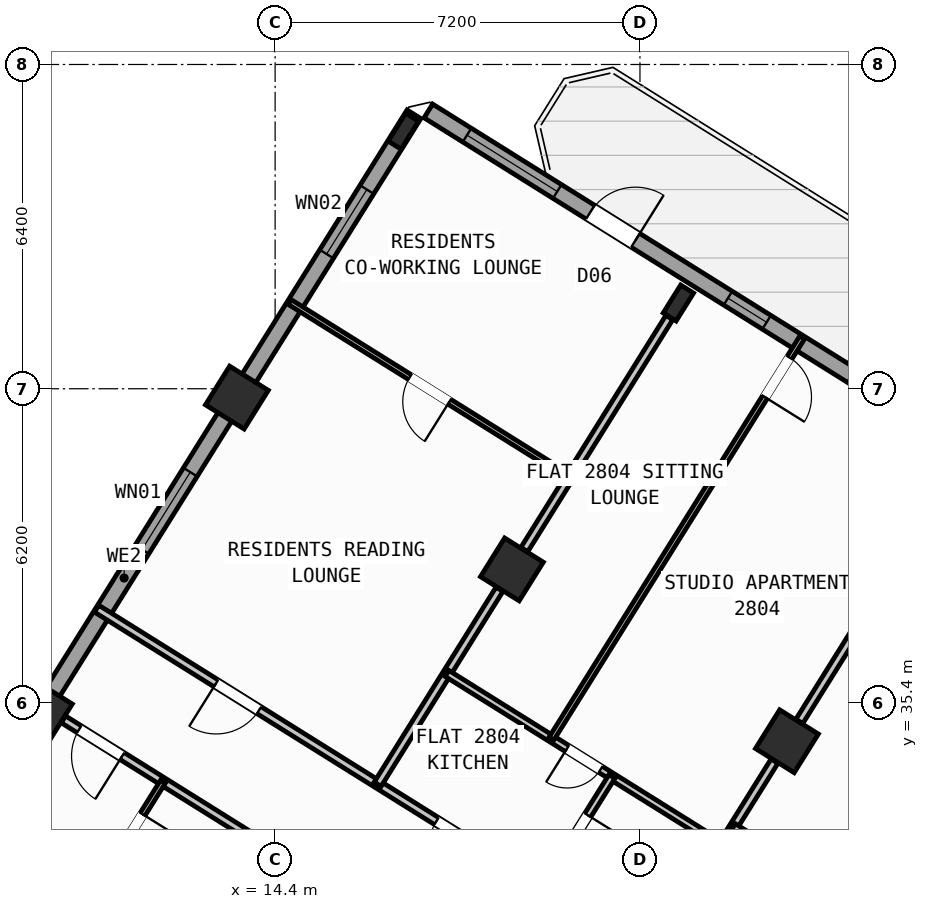
"""IFC4 building model, lengths in metres.
Left out: names, types, materials, properties, quantities, classifications, styles, units other than length and angle.
Written with IfcOpenShell. Run it as: python <this file> out.ifc"""

import sys

from ifc_helpers import new_model, si_unit, direction, frame, frame_2d, origin, origin_2d, place, context, subcontext, project, spatial, rectangle, hollow_rectangle, i_section, extrude, source, transform, mapped, element, fill, save


model = new_model("IFC4")
c1 = context("Model", 3, precision=1e-05, world=origin(), true_north=direction((0.0, 1.0)))
c2 = subcontext(c1, "Body", "Model", "MODEL_VIEW")
j1 = project(units=[si_unit("LENGTHUNIT", "METRE"), si_unit("PLANEANGLEUNIT", "RADIAN")], contexts=[c1])
p1 = place(None, origin())
s1 = spatial("IfcSite", under=j1, at=p1, CompositionType="ELEMENT")
p2 = place(p1, origin())
s2 = spatial("IfcBuilding", under=s1, at=p2, CompositionType="ELEMENT")
p3 = place(p2, frame((0.0, 0.0, 112.5)))
s3 = spatial("IfcBuildingStorey", under=s2, at=p3, CompositionType="ELEMENT", Elevation=112.5)
m1 = source(origin(), c2, "Body", "SweptSolid", [
    extrude(hollow_rectangle(XDim=0.9, YDim=0.9, WallThickness=0.036, at=origin_2d()), origin(), (0.0, 0.0, 1.0), 3.6),
])
p4 = place(p3, frame((24.5, 34.643, 0.0), z_axis=(0.0, 0.0, 1.0), x_axis=(-0.848048096156, 0.529919264233, 0.0)))
e1 = element("IfcColumn", 1, at=p4, inside=s3, PredefinedType="COLUMN", context=c2, shape_type="MappedRepresentation", body=[
    mapped(m1, transform((0.0, 0.0, 0.0), scale=1.0)),
])
m2 = source(origin(), c2, "Body", "SweptSolid", [
    extrude(i_section(OverallWidth=0.3, OverallDepth=0.65, WebThickness=0.016, FlangeThickness=0.031, at=origin_2d()), origin(), (0.0, 0.0, 1.0), 3.6),
])
p5 = place(p3, frame((22.358, 43.292, 0.0), z_axis=(0.0, 0.0, 1.0), x_axis=(-0.848048096156, 0.529919264233, 0.0)))
e2 = element("IfcColumn", 2, at=p5, inside=s3, PredefinedType="COLUMN", context=c2, shape_type="MappedRepresentation", body=[
    mapped(m2, transform((0.0, 0.0, 0.0), scale=1.0)),
])
p6 = place(p3, frame((19.073, 38.034, 0.0), z_axis=(0.0, 0.0, 1.0), x_axis=(-0.848048096156, 0.529919264233, 0.0)))
e3 = element("IfcColumn", 3, at=p6, inside=s3, PredefinedType="COLUMN", context=c2, shape_type="MappedRepresentation", body=[
    mapped(m1, transform((0.0, 0.0, 0.0), scale=1.0)),
])
p7 = place(p3, frame((16.931, 46.684, 0.0), z_axis=(0.0, 0.0, 1.0), x_axis=(-0.848048096156, 0.529919264233, 0.0)))
e4 = element("IfcColumn", 4, at=p7, inside=s3, PredefinedType="COLUMN", context=c2, shape_type="MappedRepresentation", body=[
    mapped(m2, transform((0.0, 0.0, 0.0), scale=1.0)),
])
for number, where, z_axis, x_axis in (
    (5, (13.646, 41.426, 0.0), (0.0, 0.0, 1.0), (-0.848, 0.53, 0.0)),
    (6, (9.777, 35.235, 0.0), (0.0, 0.0, 1.0), (-0.848, 0.53, 0.0)),
):
    element("IfcColumn", number, at=place(p3, frame(where, z_axis=z_axis, x_axis=x_axis)), inside=s3, PredefinedType="COLUMN", context=c2, shape_type="MappedRepresentation", body=[
        mapped(m1, transform((0.0, 0.0, 0.0), scale=1.0)),
    ])
p8 = place(p3, frame((5.7, 28.71, 0.0), z_axis=(0.0, 0.0, 1.0), x_axis=(0.529923711467, 0.8480453172, 0.0)))
e7 = element("IfcWall", 7, at=p8, inside=s3, PredefinedType="STANDARD", context=c2, shape_type="SweptSolid", body=[
    extrude(rectangle(XDim=21.587, YDim=0.32, at=frame_2d((10.794, 0.0))), origin(), (0.0, 0.0, 1.0), 2.775),
])
p9 = place(p8, frame((1.984, 0.0, 0.8)))
e8 = element("IfcOpeningElement", 8, at=p9, cuts=e7, PredefinedType="OPENING", context=c2, shape_type="SweptSolid", body=[
    extrude(rectangle(XDim=2.1, YDim=1.55, at=frame_2d((1.05, 0.775))), frame((0.0, 0.17, 0.0), z_axis=(0.0, -1.0, 0.0), x_axis=(1.0, 0.0, 0.0)), (0.0, 0.0, 1.0), 0.34),
])
p10 = place(p8, frame((11.459, 0.0, 0.85)))
e9 = element("IfcOpeningElement", 9, at=p10, cuts=e7, PredefinedType="OPENING", context=c2, shape_type="SweptSolid", body=[
    extrude(rectangle(XDim=1.8, YDim=1.5, at=frame_2d((0.9, 0.75))), frame((0.0, 0.17, 0.0), z_axis=(0.0, -1.0, 0.0), x_axis=(1.0, 0.0, 0.0)), (0.0, 0.0, 1.0), 0.34),
])
p11 = place(p8, frame((18.335, 0.0, 0.85)))
e10 = element("IfcOpeningElement", 10, at=p11, cuts=e7, PredefinedType="OPENING", context=c2, shape_type="SweptSolid", body=[
    extrude(rectangle(XDim=1.5, YDim=1.5, at=frame_2d((0.75, 0.75))), frame((0.0, 0.17, 0.0), z_axis=(0.0, -1.0, 0.0), x_axis=(1.0, 0.0, 0.0)), (0.0, 0.0, 1.0), 0.34),
])
p12 = place(p3, frame((17.424, 47.083, 0.0), z_axis=(0.0, 0.0, 1.0), x_axis=(0.848049927979, -0.529916332693, 0.0)))
e11 = element("IfcWall", 11, at=p12, inside=s3, PredefinedType="STANDARD", context=c2, shape_type="SweptSolid", body=[
    extrude(rectangle(XDim=29.223, YDim=0.32, at=frame_2d((14.612, 0.0))), origin(), (0.0, 0.0, 1.0), 3.35),
])
p13 = place(p12, frame((3.77, 0.0, 0.0)))
e12 = element("IfcOpeningElement", 12, at=p13, cuts=e11, PredefinedType="OPENING", context=c2, shape_type="SweptSolid", body=[
    extrude(rectangle(XDim=1.05, YDim=2.15, at=frame_2d((0.525, 1.075))), frame((0.0, 0.17, 0.0), z_axis=(0.0, -1.0, 0.0), x_axis=(1.0, 0.0, 0.0)), (0.0, 0.0, 1.0), 0.34),
])
p14 = place(p12, frame((0.9, 0.0, 0.8)))
e13 = element("IfcOpeningElement", 13, at=p14, cuts=e11, PredefinedType="OPENING", context=c2, shape_type="SweptSolid", body=[
    extrude(rectangle(XDim=2.1, YDim=1.55, at=frame_2d((1.05, 0.775))), frame((0.0, 0.17, 0.0), z_axis=(0.0, -1.0, 0.0), x_axis=(1.0, 0.0, 0.0)), (0.0, 0.0, 1.0), 0.34),
])
p15 = place(p12, frame((6.972, 0.0, 1.0)))
e14 = element("IfcOpeningElement", 14, at=p15, cuts=e11, PredefinedType="OPENING", context=c2, shape_type="SweptSolid", body=[
    extrude(rectangle(XDim=0.9, YDim=1.25, at=frame_2d((0.45, 0.625))), frame((0.0, 0.17, 0.0), z_axis=(0.0, -1.0, 0.0), x_axis=(1.0, 0.0, 0.0)), (0.0, 0.0, 1.0), 0.34),
])
p16 = place(p12, frame((9.847, 0.0, 0.85)))
e15 = element("IfcOpeningElement", 15, at=p16, cuts=e11, PredefinedType="OPENING", context=c2, shape_type="SweptSolid", body=[
    extrude(rectangle(XDim=1.5, YDim=1.5, at=frame_2d((0.75, 0.75))), frame((0.0, 0.17, 0.0), z_axis=(0.0, -1.0, 0.0), x_axis=(1.0, 0.0, 0.0)), (0.0, 0.0, 1.0), 0.34),
])
p17 = place(p12, frame((13.889, 0.0, 0.95)))
e16 = element("IfcOpeningElement", 16, at=p17, cuts=e11, PredefinedType="OPENING", context=c2, shape_type="SweptSolid", body=[
    extrude(rectangle(XDim=1.2, YDim=1.4, at=frame_2d((0.6, 0.7))), frame((0.0, 0.17, 0.0), z_axis=(0.0, -1.0, 0.0), x_axis=(1.0, 0.0, 0.0)), (0.0, 0.0, 1.0), 0.34),
])
p18 = place(p12, frame((17.254, 0.0, 1.0)))
e17 = element("IfcOpeningElement", 17, at=p18, cuts=e11, PredefinedType="OPENING", context=c2, shape_type="SweptSolid", body=[
    extrude(rectangle(XDim=0.9, YDim=1.25, at=frame_2d((0.45, 0.625))), frame((0.0, 0.17, 0.0), z_axis=(0.0, -1.0, 0.0), x_axis=(1.0, 0.0, 0.0)), (0.0, 0.0, 1.0), 0.34),
])
p19 = place(p12, frame((20.764, 0.0, 0.8)))
e18 = element("IfcOpeningElement", 18, at=p19, cuts=e11, PredefinedType="OPENING", context=c2, shape_type="SweptSolid", body=[
    extrude(rectangle(XDim=2.1, YDim=1.55, at=frame_2d((1.05, 0.775))), frame((0.0, 0.17, 0.0), z_axis=(0.0, -1.0, 0.0), x_axis=(1.0, 0.0, 0.0)), (0.0, 0.0, 1.0), 0.34),
])
p20 = place(p12, frame((25.403, 0.0, 0.8)))
e19 = element("IfcOpeningElement", 19, at=p20, cuts=e11, PredefinedType="OPENING", context=c2, shape_type="SweptSolid", body=[
    extrude(rectangle(XDim=2.1, YDim=1.55, at=frame_2d((1.05, 0.775))), frame((0.0, 0.17, 0.0), z_axis=(0.0, -1.0, 0.0), x_axis=(1.0, 0.0, 0.0)), (0.0, 0.0, 1.0), 0.34),
])
p21 = place(p3, frame((31.239, 38.274, 0.0), z_axis=(0.0, 0.0, 1.0), x_axis=(-0.529925472745, -0.848044216616, 0.0)))
e20 = element("IfcWall", 20, at=p21, inside=s3, PredefinedType="PARTITIONING", context=c2, shape_type="SweptSolid", body=[
    extrude(rectangle(XDim=11.65, YDim=0.16, at=frame_2d((5.825, 0.0))), origin(), (0.0, 0.0, 1.0), 3.34),
])
p22 = place(p3, frame((25.065, 28.394, 0.0), z_axis=(0.0, 0.0, 1.0), x_axis=(-0.848048310262, 0.529918921593, 0.0)))
e21 = element("IfcWall", 21, at=p22, inside=s3, PredefinedType="PARTITIONING", context=c2, shape_type="SweptSolid", body=[
    extrude(rectangle(XDim=16.73, YDim=0.16, at=frame_2d((8.365, 0.0))), origin(), (0.0, 0.0, 1.0), 3.34),
])
p23 = place(p22, frame((2.22, 0.0, 0.0)))
e22 = element("IfcOpeningElement", 22, at=p23, cuts=e21, PredefinedType="OPENING", context=c2, shape_type="SweptSolid", body=[
    extrude(rectangle(XDim=0.86, YDim=2.05, at=frame_2d((0.43, 1.025))), frame((0.0, 0.09, 0.0), z_axis=(0.0, -1.0, 0.0), x_axis=(1.0, 0.0, 0.0)), (0.0, 0.0, 1.0), 0.18),
])
p24 = place(p22, frame((7.82, 0.0, 0.0)))
e23 = element("IfcOpeningElement", 23, at=p24, cuts=e21, PredefinedType="OPENING", context=c2, shape_type="SweptSolid", body=[
    extrude(rectangle(XDim=1.0, YDim=2.1, at=frame_2d((0.5, 1.05))), frame((0.0, 0.09, 0.0), z_axis=(0.0, -1.0, 0.0), x_axis=(1.0, 0.0, 0.0)), (0.0, 0.0, 1.0), 0.18),
])
p25 = place(p22, frame((12.95, 0.0, 0.0)))
e24 = element("IfcOpeningElement", 24, at=p25, cuts=e21, PredefinedType="OPENING", context=c2, shape_type="SweptSolid", body=[
    extrude(rectangle(XDim=1.0, YDim=2.1, at=frame_2d((0.5, 1.05))), frame((0.0, 0.09, 0.0), z_axis=(0.0, -1.0, 0.0), x_axis=(1.0, 0.0, 0.0)), (0.0, 0.0, 1.0), 0.18),
])
p26 = place(p3, frame((14.866, 32.173, 0.0), z_axis=(0.0, 0.0, 1.0), x_axis=(-0.848053401719, 0.529910773464, 0.0)))
e25 = element("IfcWall", 25, at=p26, inside=s3, PredefinedType="PARTITIONING", context=c2, shape_type="SweptSolid", body=[
    extrude(rectangle(XDim=5.476, YDim=0.16, at=frame_2d((2.738, 0.0))), origin(), (0.0, 0.0, 1.0), 2.775),
])
p27 = place(p26, frame((4.108, 0.0, 0.0)))
e26 = element("IfcOpeningElement", 26, at=p27, cuts=e25, PredefinedType="OPENING", context=c2, shape_type="SweptSolid", body=[
    extrude(rectangle(XDim=1.0, YDim=2.1, at=frame_2d((0.5, 1.05))), frame((0.0, 0.09, 0.0), z_axis=(0.0, -1.0, 0.0), x_axis=(1.0, 0.0, 0.0)), (0.0, 0.0, 1.0), 0.18),
])
p28 = place(p3, frame((12.188, 33.847, 0.0), z_axis=(0.0, 0.0, 1.0), x_axis=(-0.529917860021, -0.848048973604, 0.0)))
e27 = element("IfcWall", 27, at=p28, inside=s3, PredefinedType="PARTITIONING", context=c2, shape_type="SweptSolid", body=[
    extrude(rectangle(XDim=8.12, YDim=0.11, at=frame_2d((4.06, 0.0))), origin(), (0.0, 0.0, 1.0), 3.34),
])
p29 = place(p28, frame((0.76, 0.0, 0.0)))
e28 = element("IfcOpeningElement", 28, at=p29, cuts=e27, PredefinedType="OPENING", context=c2, shape_type="SweptSolid", body=[
    extrude(rectangle(XDim=0.78, YDim=2.05, at=frame_2d((0.39, 1.025))), frame((0.0, 0.065, 0.0), z_axis=(0.0, -1.0, 0.0), x_axis=(1.0, 0.0, 0.0)), (0.0, 0.0, 1.0), 0.13),
])
p30 = place(p28, frame((4.8, 0.0, 0.0)))
e29 = element("IfcOpeningElement", 29, at=p30, cuts=e27, PredefinedType="OPENING", context=c2, shape_type="SweptSolid", body=[
    extrude(rectangle(XDim=0.92, YDim=2.08, at=frame_2d((0.46, 1.04))), frame((0.0, 0.065, 0.0), z_axis=(0.0, -1.0, 0.0), x_axis=(1.0, 0.0, 0.0)), (0.0, 0.0, 1.0), 0.13),
])
p31 = place(p3, frame((10.916, 31.811, 0.0), z_axis=(0.0, 0.0, 1.0), x_axis=(-0.84802195137, 0.529961102341, 0.0)))
e30 = element("IfcWall", 30, at=p31, inside=s3, PredefinedType="PLUMBINGWALL", context=c2, shape_type="SweptSolid", body=[
    extrude(rectangle(XDim=2.9, YDim=0.14, at=frame_2d((1.45, 0.0))), origin(), (0.0, 0.0, 1.0), 3.34),
])
p32 = place(p31, frame((0.99, 0.0, 0.0)))
e31 = element("IfcOpeningElement", 31, at=p32, cuts=e30, PredefinedType="OPENING", context=c2, shape_type="SweptSolid", body=[
    extrude(rectangle(XDim=0.92, YDim=2.08, at=frame_2d((0.46, 1.04))), frame((0.0, 0.08, 0.0), z_axis=(0.0, -1.0, 0.0), x_axis=(1.0, 0.0, 0.0)), (0.0, 0.0, 1.0), 0.16),
])
p33 = place(p3, frame((27.607, 39.615, 0.0), z_axis=(0.0, 0.0, 1.0), x_axis=(-0.529913610495, -0.848051628978, 0.0)))
e32 = element("IfcWall", 32, at=p33, inside=s3, PredefinedType="PARTITIONING", context=c2, shape_type="SweptSolid", body=[
    extrude(rectangle(XDim=5.401, YDim=0.16, at=frame_2d((2.7, 0.0))), origin(), (0.0, 0.0, 1.0), 2.775),
])
p34 = place(p3, frame((24.256, 34.251, 0.0), z_axis=(0.0, 0.0, 1.0), x_axis=(-0.529926399231, -0.848043637673, 0.0)))
e33 = element("IfcWall", 33, at=p34, inside=s3, PredefinedType="PARTITIONING", context=c2, shape_type="SweptSolid", body=[
    extrude(rectangle(XDim=4.538, YDim=0.16, at=frame_2d((2.269, 0.0))), origin(), (0.0, 0.0, 1.0), 2.775),
])
p35 = place(p3, frame((26.66, 30.947, 0.0), z_axis=(0.0, 0.0, 1.0), x_axis=(-0.84803087207, 0.529946827537, 0.0)))
e34 = element("IfcWall", 34, at=p35, inside=s3, PredefinedType="PLUMBINGWALL", context=c2, shape_type="SweptSolid", body=[
    extrude(rectangle(XDim=3.79, YDim=0.14, at=frame_2d((1.895, 0.0))), origin(), (0.0, 0.0, 1.0), 3.34),
])
p36 = place(p35, frame((2.23, 0.0, 0.0)))
e35 = element("IfcOpeningElement", 35, at=p36, cuts=e34, PredefinedType="OPENING", context=c2, shape_type="SweptSolid", body=[
    extrude(rectangle(XDim=0.92, YDim=2.08, at=frame_2d((0.46, 1.04))), frame((0.0, 0.08, 0.0), z_axis=(0.0, -1.0, 0.0), x_axis=(1.0, 0.0, 0.0)), (0.0, 0.0, 1.0), 0.16),
])
p37 = place(p3, frame((22.18, 43.006, 0.0), z_axis=(0.0, 0.0, 1.0), x_axis=(-0.529913610495, -0.848051628978, 0.0)))
e36 = element("IfcWall", 36, at=p37, inside=s3, PredefinedType="PARTITIONING", context=c2, shape_type="SweptSolid", body=[
    extrude(rectangle(XDim=5.401, YDim=0.16, at=frame_2d((2.7, 0.0))), origin(), (0.0, 0.0, 1.0), 2.775),
])
p38 = place(p3, frame((18.828, 37.643, 0.0), z_axis=(0.0, 0.0, 1.0), x_axis=(-0.529926399231, -0.848043637673, 0.0)))
e37 = element("IfcWall", 37, at=p38, inside=s3, PredefinedType="PARTITIONING", context=c2, shape_type="SweptSolid", body=[
    extrude(rectangle(XDim=4.538, YDim=0.16, at=frame_2d((2.269, 0.0))), origin(), (0.0, 0.0, 1.0), 2.775),
])
p39 = place(p3, frame((23.218, 32.591, 0.0), z_axis=(0.0, 0.0, 1.0), x_axis=(-0.848056163074, 0.529906354247, 0.0)))
e38 = element("IfcWall", 38, at=p39, inside=s3, PredefinedType="PLUMBINGWALL", context=c2, shape_type="SweptSolid", body=[
    extrude(rectangle(XDim=6.4, YDim=0.14, at=frame_2d((3.2, 0.0))), origin(), (0.0, 0.0, 1.0), 3.34),
])
p40 = place(p39, frame((2.824, 0.0, 0.0)))
e39 = element("IfcOpeningElement", 39, at=p40, cuts=e38, PredefinedType="OPENING", context=c2, shape_type="SweptSolid", body=[
    extrude(rectangle(XDim=0.78, YDim=2.05, at=frame_2d((0.39, 1.025))), frame((0.0, 0.08, 0.0), z_axis=(0.0, -1.0, 0.0), x_axis=(1.0, 0.0, 0.0)), (0.0, 0.0, 1.0), 0.16),
])
p41 = place(p3, frame((21.047, 33.947, 0.0), z_axis=(0.0, 0.0, 1.0), x_axis=(-0.529913878929, -0.848051461244, 0.0)))
e40 = element("IfcWall", 40, at=p41, inside=s3, PredefinedType="PLUMBINGWALL", context=c2, shape_type="SweptSolid", body=[
    extrude(rectangle(XDim=2.58, YDim=0.14, at=frame_2d((1.29, 0.0))), origin(), (0.0, 0.0, 1.0), 3.34),
])
p42 = place(p41, frame((0.9, 0.0, 0.0)))
e41 = element("IfcOpeningElement", 41, at=p42, cuts=e40, PredefinedType="OPENING", context=c2, shape_type="SweptSolid", body=[
    extrude(rectangle(XDim=0.78, YDim=2.05, at=frame_2d((0.39, 1.025))), frame((0.0, 0.08, 0.0), z_axis=(0.0, -1.0, 0.0), x_axis=(1.0, 0.0, 0.0)), (0.0, 0.0, 1.0), 0.16),
])
p43 = place(p3, frame((24.802, 42.614, 0.0), z_axis=(0.0, 0.0, 1.0), x_axis=(-0.529926099889, -0.848043824727, 0.0)))
e42 = element("IfcWall", 42, at=p43, inside=s3, PredefinedType="PARTITIONING", context=c2, shape_type="SweptSolid", body=[
    extrude(rectangle(XDim=9.34, YDim=0.11, at=frame_2d((4.67, 0.0))), origin(), (0.0, 0.0, 1.0), 3.34),
])
p44 = place(p43, frame((0.47, 0.0, 0.0)))
e43 = element("IfcOpeningElement", 43, at=p44, cuts=e42, PredefinedType="OPENING", context=c2, shape_type="SweptSolid", body=[
    extrude(rectangle(XDim=0.92, YDim=2.08, at=frame_2d((0.46, 1.04))), frame((0.0, 0.065, 0.0), z_axis=(0.0, -1.0, 0.0), x_axis=(1.0, 0.0, 0.0)), (0.0, 0.0, 1.0), 0.13),
])
p45 = place(p3, frame((20.213, 39.859, 0.0), z_axis=(0.0, 0.0, 1.0), x_axis=(-0.848048787466, 0.529918157905, 0.0)))
e44 = element("IfcWall", 44, at=p45, inside=s3, PredefinedType="PARTITIONING", context=c2, shape_type="SweptSolid", body=[
    extrude(rectangle(XDim=6.52, YDim=0.11, at=frame_2d((3.26, 0.0))), origin(), (0.0, 0.0, 1.0), 3.34),
])
p46 = place(p45, frame((2.8, 0.0, 0.0)))
e45 = element("IfcOpeningElement", 45, at=p46, cuts=e44, PredefinedType="OPENING", context=c2, shape_type="SweptSolid", body=[
    extrude(rectangle(XDim=0.92, YDim=2.08, at=frame_2d((0.46, 1.04))), frame((0.0, 0.065, 0.0), z_axis=(0.0, -1.0, 0.0), x_axis=(1.0, 0.0, 0.0)), (0.0, 0.0, 1.0), 0.13),
])
m3 = source(origin(), c2, "Body", "SweptSolid", [
    extrude(rectangle(XDim=1.05, YDim=2.15, at=frame_2d((0.525, 1.075))), frame((0.0, 0.025, 0.0), z_axis=(0.0, -1.0, 0.0), x_axis=(1.0, 0.0, 0.0)), (0.0, 0.0, 1.0), 0.05),
])
p47 = place(p13, origin())
e46 = element("IfcDoor", 46, at=p47, inside=s3, OperationType="SINGLE_SWING_RIGHT", PredefinedType="DOOR", context=c2, shape_type="MappedRepresentation", body=[
    mapped(m3, transform((0.0, 0.0, 0.0), scale=1.0)),
])
fill(e12, e46)
m4 = source(origin(), c2, "Body", "SweptSolid", [
    extrude(rectangle(XDim=1.8, YDim=1.5, at=frame_2d((0.9, 0.75))), frame((0.0, 0.03, 0.0), z_axis=(0.0, -1.0, 0.0), x_axis=(1.0, 0.0, 0.0)), (0.0, 0.0, 1.0), 0.06),
])
p48 = place(p10, origin())
e47 = element("IfcWindow", 47, at=p48, inside=s3, PartitioningType="SINGLE_PANEL", PredefinedType="WINDOW", context=c2, shape_type="MappedRepresentation", body=[
    mapped(m4, transform((0.0, 0.0, 0.0), scale=1.0)),
])
fill(e9, e47)
m5 = source(origin(), c2, "Body", "SweptSolid", [
    extrude(rectangle(XDim=1.5, YDim=1.5, at=frame_2d((0.75, 0.75))), frame((0.0, 0.03, 0.0), z_axis=(0.0, -1.0, 0.0), x_axis=(1.0, 0.0, 0.0)), (0.0, 0.0, 1.0), 0.06),
])
p49 = place(p11, origin())
e48 = element("IfcWindow", 48, at=p49, inside=s3, PartitioningType="SINGLE_PANEL", PredefinedType="WINDOW", context=c2, shape_type="MappedRepresentation", body=[
    mapped(m5, transform((0.0, 0.0, 0.0), scale=1.0)),
])
fill(e10, e48)
m6 = source(origin(), c2, "Body", "SweptSolid", [
    extrude(rectangle(XDim=2.1, YDim=1.55, at=frame_2d((1.05, 0.775))), frame((0.0, 0.03, 0.0), z_axis=(0.0, -1.0, 0.0), x_axis=(1.0, 0.0, 0.0)), (0.0, 0.0, 1.0), 0.06),
])
p50 = place(p14, origin())
e49 = element("IfcWindow", 49, at=p50, inside=s3, PartitioningType="SINGLE_PANEL", PredefinedType="WINDOW", context=c2, shape_type="MappedRepresentation", body=[
    mapped(m6, transform((0.0, 0.0, 0.0), scale=1.0)),
])
fill(e13, e49)
m7 = source(origin(), c2, "Body", "SweptSolid", [
    extrude(rectangle(XDim=0.9, YDim=1.25, at=frame_2d((0.45, 0.625))), frame((0.0, 0.03, 0.0), z_axis=(0.0, -1.0, 0.0), x_axis=(1.0, 0.0, 0.0)), (0.0, 0.0, 1.0), 0.06),
])
p51 = place(p15, origin())
e50 = element("IfcWindow", 50, at=p51, inside=s3, PartitioningType="SINGLE_PANEL", PredefinedType="WINDOW", context=c2, shape_type="MappedRepresentation", body=[
    mapped(m7, transform((0.0, 0.0, 0.0), scale=1.0)),
])
fill(e14, e50)
m8 = source(origin(), c2, "Body", "SweptSolid", [
    extrude(rectangle(XDim=1.0, YDim=2.1, at=frame_2d((0.5, 1.05))), frame((0.0, 0.025, 0.0), z_axis=(0.0, -1.0, 0.0), x_axis=(1.0, 0.0, 0.0)), (0.0, 0.0, 1.0), 0.05),
])
p52 = place(p27, origin())
e51 = element("IfcDoor", 51, at=p52, inside=s3, OperationType="SINGLE_SWING_LEFT", PredefinedType="DOOR", context=c2, shape_type="MappedRepresentation", body=[
    mapped(m8, transform((0.0, 0.0, 0.0), scale=1.0)),
])
fill(e26, e51)
m9 = source(origin(), c2, "Body", "SweptSolid", [
    extrude(rectangle(XDim=0.78, YDim=2.05, at=frame_2d((0.39, 1.025))), frame((0.0, 0.025, 0.0), z_axis=(0.0, -1.0, 0.0), x_axis=(1.0, 0.0, 0.0)), (0.0, 0.0, 1.0), 0.05),
])
p53 = place(p29, origin())
e52 = element("IfcDoor", 52, at=p53, inside=s3, OperationType="SINGLE_SWING_LEFT", PredefinedType="DOOR", context=c2, shape_type="MappedRepresentation", body=[
    mapped(m9, transform((0.0, 0.0, 0.0), scale=1.0)),
])
fill(e28, e52)
m10 = source(origin(), c2, "Body", "SweptSolid", [
    extrude(rectangle(XDim=0.92, YDim=2.08, at=frame_2d((0.46, 1.04))), frame((0.0, 0.025, 0.0), z_axis=(0.0, -1.0, 0.0), x_axis=(1.0, 0.0, 0.0)), (0.0, 0.0, 1.0), 0.05),
])
p54 = place(p44, origin())
e53 = element("IfcDoor", 53, at=p54, inside=s3, OperationType="SINGLE_SWING_RIGHT", PredefinedType="DOOR", context=c2, shape_type="MappedRepresentation", body=[
    mapped(m10, transform((0.0, 0.0, 0.0), scale=1.0)),
])
fill(e43, e53)
p55 = place(p24, origin())
e54 = element("IfcDoor", 54, at=p55, inside=s3, OperationType="SINGLE_SWING_LEFT", PredefinedType="DOOR", context=c2, shape_type="MappedRepresentation", body=[
    mapped(m8, transform((0.0, 0.0, 0.0), scale=1.0)),
])
fill(e23, e54)
p56 = place(p40, origin())
e55 = element("IfcDoor", 55, at=p56, inside=s3, OperationType="SINGLE_SWING_RIGHT", PredefinedType="DOOR", context=c2, shape_type="MappedRepresentation", body=[
    mapped(m9, transform((0.0, 0.0, 0.0), scale=1.0)),
])
fill(e39, e55)
p57 = place(p42, origin())
e56 = element("IfcDoor", 56, at=p57, inside=s3, OperationType="SINGLE_SWING_LEFT", PredefinedType="DOOR", context=c2, shape_type="MappedRepresentation", body=[
    mapped(m9, transform((0.0, 0.0, 0.0), scale=1.0)),
])
fill(e41, e56)
p58 = place(p25, origin())
e57 = element("IfcDoor", 57, at=p58, inside=s3, OperationType="SINGLE_SWING_RIGHT", PredefinedType="DOOR", context=c2, shape_type="MappedRepresentation", body=[
    mapped(m8, transform((0.0, 0.0, 0.0), scale=1.0)),
])
fill(e24, e57)
p59 = place(p46, origin())
e58 = element("IfcDoor", 58, at=p59, inside=s3, OperationType="SINGLE_SWING_LEFT", PredefinedType="DOOR", context=c2, shape_type="MappedRepresentation", body=[
    mapped(m10, transform((0.0, 0.0, 0.0), scale=1.0)),
])
fill(e45, e58)
save(model, sys.argv[1])
